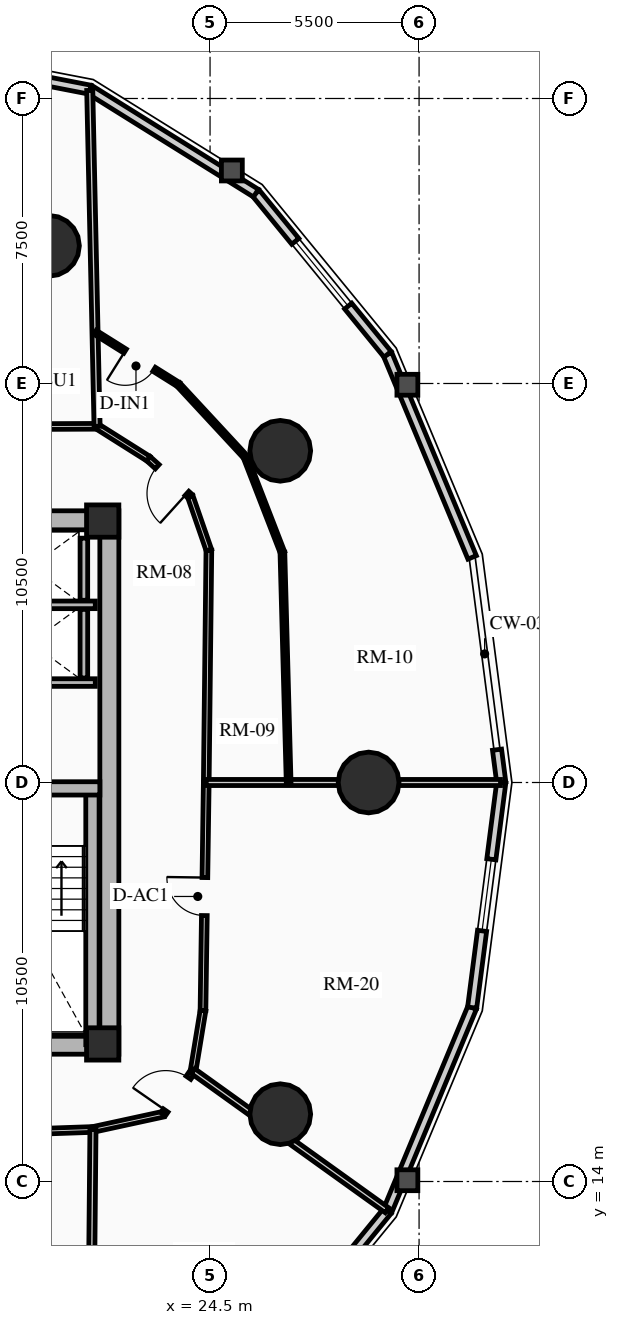
"""IFC4 building model, lengths in metres.
Left out: names, types, materials, properties, quantities, classifications, styles, units other than length and angle.
Written with IfcOpenShell. Run it as: python <this file> out.ifc"""

import sys

from ifc_helpers import new_model, si_unit, direction, frame, frame_2d, origin, origin_2d, place, context, subcontext, project, spatial, rectangle, circle, extrude, source, transform, mapped, element, fill, save


model = new_model("IFC4")
c1 = context("Model", 3, precision=1e-05, world=origin(), true_north=direction((0.0, 1.0)))
c2 = subcontext(c1, "Body", "Model", "MODEL_VIEW")
j1 = project(units=[si_unit("LENGTHUNIT", "METRE"), si_unit("PLANEANGLEUNIT", "RADIAN")], contexts=[c1])
p1 = place(None, origin())
s1 = spatial("IfcSite", under=j1, at=p1, CompositionType="ELEMENT")
p2 = place(p1, origin())
s2 = spatial("IfcBuilding", under=s1, at=p2, CompositionType="ELEMENT")
p3 = place(p2, frame((0.0, 0.0, 62.74)))
s3 = spatial("IfcBuildingStorey", under=s2, at=p3, CompositionType="ELEMENT", Elevation=62.74)
p4 = place(p3, frame((21.85, 17.35, 0.0), z_axis=(0.0, 0.0, 1.0), x_axis=(0.0, 1.0, 0.0)))
e1 = element("IfcWall", 1, at=p4, inside=s3, PredefinedType="SHEAR", context=c2, shape_type="SweptSolid", body=[
    extrude(rectangle(XDim=14.3, YDim=0.5, at=frame_2d((7.15, 0.0))), origin(), (0.0, 0.0, 1.0), 2.91),
])
p5 = place(p3, frame((11.15, 17.6, 0.0), z_axis=(0.0, 0.0, 1.0), x_axis=(1.0, 0.0, 0.0)))
e2 = element("IfcWall", 2, at=p5, inside=s3, PredefinedType="SHEAR", context=c2, shape_type="SweptSolid", body=[
    extrude(rectangle(XDim=10.7, YDim=0.5, at=frame_2d((5.35, 0.0))), origin(), (0.0, 0.0, 1.0), 2.91),
])
m1 = source(origin(), c2, "Body", "SweptSolid", [
    extrude(rectangle(XDim=1.5, YDim=2.02, at=frame_2d((0.75, 1.01))), frame((0.0, 0.26, 0.0), z_axis=(0.0, -1.0, 0.0), x_axis=(1.0, 0.0, 0.0)), (0.0, 0.0, 1.0), 0.52),
])
p6 = place(p5, frame((5.45, 0.0, 0.0)))
e3 = element("IfcOpeningElement", 3, at=p6, cuts=e2, PredefinedType="OPENING", context=c2, shape_type="MappedRepresentation", body=[
    mapped(m1, transform((0.0, 0.0, 0.0), x_axis=(1.0, 0.0, 0.0), y_axis=(0.0, 1.0, 0.0), z_axis=(0.0, 0.0, 1.0), scale=1.0)),
])
p7 = place(p3, frame((11.15, 31.4, 0.0), z_axis=(0.0, 0.0, 1.0), x_axis=(1.0, 0.0, 0.0)))
e4 = element("IfcWall", 4, at=p7, inside=s3, PredefinedType="SHEAR", context=c2, shape_type="SweptSolid", body=[
    extrude(rectangle(XDim=10.7, YDim=0.5, at=frame_2d((5.35, 0.0))), origin(), (0.0, 0.0, 1.0), 2.91),
])
p8 = place(p7, frame((4.6, 0.0, 0.0)))
e5 = element("IfcOpeningElement", 5, at=p8, cuts=e4, PredefinedType="OPENING", context=c2, shape_type="MappedRepresentation", body=[
    mapped(m1, transform((0.0, 0.0, 0.0), x_axis=(1.0, 0.0, 0.0), y_axis=(0.0, 1.0, 0.0), z_axis=(0.0, 0.0, 1.0), scale=1.0)),
])
p9 = place(p3, frame((21.405, 17.6, 0.0), z_axis=(0.0, 0.0, 1.0), x_axis=(0.0, 1.0, 0.0)))
e6 = element("IfcWall", 6, at=p9, inside=s3, PredefinedType="SHEAR", context=c2, shape_type="SweptSolid", body=[
    extrude(rectangle(XDim=6.745, YDim=0.35, at=frame_2d((3.373, 0.0))), origin(), (0.0, 0.0, 1.0), 2.91),
])
p10 = place(p3, frame((18.315, 24.345, 0.0), z_axis=(0.0, 0.0, 1.0), x_axis=(1.0, 0.0, 0.0)))
e7 = element("IfcWall", 7, at=p10, inside=s3, PredefinedType="SHEAR", context=c2, shape_type="SweptSolid", body=[
    extrude(rectangle(XDim=3.285, YDim=0.35, at=frame_2d((1.643, 0.0))), origin(), (0.0, 0.0, 1.0), 2.91),
])
for number, where, z_axis, x_axis in (
    (8, (21.675, 17.62, 0.0), (0.0, 0.0, 1.0), (1.0, 0.0, 0.0)),
    (9, (21.675, 31.38, 0.0), (0.0, 0.0, 1.0), (1.0, 0.0, 0.0)),
):
    element("IfcColumn", number, at=place(p3, frame(where, z_axis=z_axis, x_axis=x_axis)), inside=s3, PredefinedType="COLUMN", context=c2, shape_type="SweptSolid", body=[
        extrude(rectangle(XDim=0.85, YDim=0.85, at=origin_2d()), origin(), (0.0, 0.0, 1.0), 2.91),
    ])
for number, where, z_axis, x_axis in (
    (10, (28.672, 24.5, 0.0), (0.0, 0.0, 1.0), (1.0, 0.0, 0.0)),
    (11, (26.347, 33.229, 0.0), (0.0, 0.0, 1.0), (1.0, 0.0, 0.0)),
    (12, (20.261, 38.623, 0.0), (0.0, 0.0, 1.0), (1.0, 0.0, 0.0)),
    (13, (26.347, 15.771, 0.0), (0.0, 0.0, 1.0), (1.0, 0.0, 0.0)),
):
    element("IfcColumn", number, at=place(p3, frame(where, z_axis=z_axis, x_axis=x_axis)), inside=s3, PredefinedType="USERDEFINED", context=c2, shape_type="SweptSolid", body=[
        extrude(circle(Radius=0.8, at=origin_2d()), origin(), (0.0, 0.0, 1.0), 2.91),
    ])
p11 = place(p3, frame((32.051, 25.363, 0.0), z_axis=(0.0, 0.0, 1.0), x_axis=(0.128523364007, -0.991706481225, 0.0)))
e14 = element("IfcWall", 14, at=p11, inside=s3, PredefinedType="SOLIDWALL", context=c2, shape_type="SweptSolid", body=[
    extrude(rectangle(XDim=0.87, YDim=0.24, at=frame_2d((0.435, 0.0))), origin(), (0.0, 0.0, 1.0), 2.555),
])
p12 = place(p3, frame((29.172, 35.768, 0.0), z_axis=(0.0, 0.0, 1.0), x_axis=(0.384348836956, -0.923187939442, 0.0)))
e15 = element("IfcWall", 15, at=p12, inside=s3, PredefinedType="SOLIDWALL", context=c2, shape_type="SweptSolid", body=[
    extrude(rectangle(XDim=5.789, YDim=0.24, at=frame_2d((2.894, 0.0))), origin(), (0.0, 0.0, 1.0), 2.079),
])
p13 = place(p3, frame((25.707, 40.009, 0.0), z_axis=(0.0, 0.0, 1.0), x_axis=(0.632713287022, -0.77438614168, 0.0)))
e16 = element("IfcWall", 16, at=p13, inside=s3, PredefinedType="SOLIDWALL", context=c2, shape_type="SweptSolid", body=[
    extrude(rectangle(XDim=5.477, YDim=0.24, at=frame_2d((2.738, 0.0))), origin(), (0.0, 0.0, 1.0), 2.079),
])
m2 = source(origin(), c2, "Body", "SweptSolid", [
    extrude(rectangle(XDim=2.2, YDim=1.35, at=frame_2d((1.1, 0.675))), frame((0.0, 0.13, 0.0), z_axis=(0.0, -1.0, 0.0), x_axis=(1.0, 0.0, 0.0)), (0.0, 0.0, 1.0), 0.26),
])
p14 = place(p13, frame((1.638, 0.0, 0.65)))
e17 = element("IfcOpeningElement", 17, at=p14, cuts=e16, PredefinedType="OPENING", context=c2, shape_type="MappedRepresentation", body=[
    mapped(m2, transform((0.0, 0.0, 0.0), x_axis=(1.0, 0.0, 0.0), y_axis=(0.0, 1.0, 0.0), z_axis=(0.0, 0.0, 1.0), scale=1.0)),
])
p15 = place(p3, frame((21.34, 42.732, 0.0), z_axis=(0.0, 0.0, 1.0), x_axis=(0.848533613342, -0.529141481107, 0.0)))
e18 = element("IfcWall", 18, at=p15, inside=s3, PredefinedType="SOLIDWALL", context=c2, shape_type="SweptSolid", body=[
    extrude(rectangle(XDim=5.146, YDim=0.24, at=frame_2d((2.573, 0.0))), origin(), (0.0, 0.0, 1.0), 2.079),
])
p16 = place(p3, frame((16.5, 43.67, 0.0), z_axis=(0.0, 0.0, 1.0), x_axis=(0.981725274071, -0.190303668512, 0.0)))
e19 = element("IfcWall", 19, at=p16, inside=s3, PredefinedType="SOLIDWALL", context=c2, shape_type="SweptSolid", body=[
    extrude(rectangle(XDim=4.93, YDim=0.24, at=frame_2d((2.465, 0.0))), origin(), (0.0, 0.0, 1.0), 2.079),
])
m3 = source(origin(), c2, "Body", "SweptSolid", [
    extrude(rectangle(XDim=1.9, YDim=1.35, at=frame_2d((0.95, 0.675))), frame((0.0, 0.13, 0.0), z_axis=(0.0, -1.0, 0.0), x_axis=(1.0, 0.0, 0.0)), (0.0, 0.0, 1.0), 0.26),
])
p17 = place(p16, frame((1.515, 0.0, 0.65)))
e20 = element("IfcOpeningElement", 20, at=p17, cuts=e19, PredefinedType="OPENING", context=c2, shape_type="MappedRepresentation", body=[
    mapped(m3, transform((0.0, 0.0, 0.0), x_axis=(1.0, 0.0, 0.0), y_axis=(0.0, 1.0, 0.0), z_axis=(0.0, 0.0, 1.0), scale=1.0)),
])
p18 = place(p3, frame((29.172, 13.232, 0.0), z_axis=(0.0, 0.0, 1.0), x_axis=(-0.632713287022, -0.77438614168, 0.0)))
e21 = element("IfcWall", 21, at=p18, inside=s3, PredefinedType="SOLIDWALL", context=c2, shape_type="SweptSolid", body=[
    extrude(rectangle(XDim=5.477, YDim=0.24, at=frame_2d((2.738, 0.0))), origin(), (0.0, 0.0, 1.0), 2.079),
])
p19 = place(p18, frame((1.638, 0.0, 0.65)))
e22 = element("IfcOpeningElement", 22, at=p19, cuts=e21, PredefinedType="OPENING", context=c2, shape_type="MappedRepresentation", body=[
    mapped(m2, transform((0.0, 0.0, 0.0), x_axis=(1.0, 0.0, 0.0), y_axis=(0.0, 1.0, 0.0), z_axis=(0.0, 0.0, 1.0), scale=1.0)),
])
p20 = place(p3, frame((31.396, 18.576, 0.0), z_axis=(0.0, 0.0, 1.0), x_axis=(-0.384348836956, -0.923187939442, 0.0)))
e23 = element("IfcWall", 23, at=p20, inside=s3, PredefinedType="SOLIDWALL", context=c2, shape_type="SweptSolid", body=[
    extrude(rectangle(XDim=5.789, YDim=0.24, at=frame_2d((2.894, 0.0))), origin(), (0.0, 0.0, 1.0), 2.079),
])
p21 = place(p3, frame((32.163, 24.5, 0.0), z_axis=(0.0, 0.0, 1.0), x_axis=(-0.128339641463, -0.991730274031, 0.0)))
e24 = element("IfcWall", 24, at=p21, inside=s3, PredefinedType="SOLIDWALL", context=c2, shape_type="SweptSolid", body=[
    extrude(rectangle(XDim=5.973, YDim=0.24, at=frame_2d((2.987, 0.0))), origin(), (0.0, 0.0, 1.0), 2.079),
])
p22 = place(p21, frame((2.037, 0.0, 0.65)))
e25 = element("IfcOpeningElement", 25, at=p22, cuts=e24, PredefinedType="OPENING", context=c2, shape_type="MappedRepresentation", body=[
    mapped(m3, transform((0.0, 0.0, 0.0), x_axis=(1.0, 0.0, 0.0), y_axis=(0.0, 1.0, 0.0), z_axis=(0.0, 0.0, 1.0), scale=1.0)),
])
for number, where, z_axis, x_axis in (
    (26, (18.51, 27.13, 0.0), (0.0, 0.0, 1.0), (1.0, 0.0, 0.0)),
    (27, (18.51, 29.175, 0.0), (0.0, 0.0, 1.0), (1.0, 0.0, 0.0)),
):
    element("IfcWall", number, at=place(p3, frame(where, z_axis=z_axis, x_axis=x_axis)), inside=s3, PredefinedType="SHEAR", context=c2, shape_type="SweptSolid", body=[
        extrude(rectangle(XDim=2.97, YDim=0.2, at=frame_2d((1.485, 0.0))), origin(), (0.0, 0.0, 1.0), 2.91),
    ])
p23 = place(p3, frame((21.18, 27.25, 0.0), z_axis=(0.0, 0.0, 1.0), x_axis=(0.0, 1.0, 0.0)))
e28 = element("IfcWall", 28, at=p23, inside=s3, PredefinedType="SHEAR", context=c2, shape_type="SweptSolid", body=[
    extrude(rectangle(XDim=1.805, YDim=0.2, at=frame_2d((0.902, 0.0))), origin(), (0.0, 0.0, 1.0), 2.91),
])
p24 = place(p3, frame((21.18, 29.295, 0.0), z_axis=(0.0, 0.0, 1.0), x_axis=(0.0, 1.0, 0.0)))
e29 = element("IfcWall", 29, at=p24, inside=s3, PredefinedType="SHEAR", context=c2, shape_type="SweptSolid", body=[
    extrude(rectangle(XDim=1.635, YDim=0.2, at=frame_2d((0.817, 0.0))), origin(), (0.0, 0.0, 1.0), 2.91),
])
p25 = place(p3, frame((24.4, 24.5, 0.0), z_axis=(0.0, 0.0, 1.0), x_axis=(0.011299841544, 0.999936154752, 0.0)))
e30 = element("IfcWall", 30, at=p25, inside=s3, PredefinedType="PARTITIONING", context=c2, shape_type="SweptSolid", body=[
    extrude(rectangle(XDim=6.115, YDim=0.15, at=frame_2d((3.057, 0.0))), origin(), (0.0, 0.0, 1.0), 2.079),
])
p26 = place(p3, frame((24.469, 30.614, 0.0), z_axis=(0.0, 0.0, 1.0), x_axis=(-0.327228335485, 0.944945298129, 0.0)))
e31 = element("IfcWall", 31, at=p26, inside=s3, PredefinedType="PARTITIONING", context=c2, shape_type="SweptSolid", body=[
    extrude(rectangle(XDim=1.495, YDim=0.15, at=frame_2d((0.748, 0.0))), origin(), (0.0, 0.0, 1.0), 2.125),
])
p27 = place(p3, frame((23.98, 32.027, 0.0), z_axis=(0.0, 0.0, 1.0), x_axis=(-0.742353224332, 0.670008724065, 0.0)))
e32 = element("IfcWall", 32, at=p27, inside=s3, PredefinedType="PARTITIONING", context=c2, shape_type="SweptSolid", body=[
    extrude(rectangle(XDim=1.485, YDim=0.15, at=frame_2d((0.742, 0.0))), origin(), (0.0, 0.0, 1.0), 2.079),
])
m4 = source(origin(), c2, "Body", "SweptSolid", [
    extrude(rectangle(XDim=1.05, YDim=2.015, at=frame_2d((0.525, 1.007))), frame((0.0, 0.085, 0.0), z_axis=(0.0, -1.0, 0.0), x_axis=(1.0, 0.0, 0.0)), (0.0, 0.0, 1.0), 0.17),
])
p28 = place(p27, frame((0.12, 0.0, 0.0)))
e33 = element("IfcOpeningElement", 33, at=p28, cuts=e32, PredefinedType="OPENING", context=c2, shape_type="MappedRepresentation", body=[
    mapped(m4, transform((0.0, 0.0, 0.0), x_axis=(1.0, 0.0, 0.0), y_axis=(0.0, 1.0, 0.0), z_axis=(0.0, 0.0, 1.0), scale=1.0)),
])
p29 = place(p3, frame((22.877, 33.022, 0.0), z_axis=(0.0, 0.0, 1.0), x_axis=(-0.845895608855, 0.533348496689, 0.0)))
e34 = element("IfcWall", 34, at=p29, inside=s3, PredefinedType="PARTITIONING", context=c2, shape_type="SweptSolid", body=[
    extrude(rectangle(XDim=1.597, YDim=0.15, at=frame_2d((0.798, 0.0))), origin(), (0.0, 0.0, 1.0), 2.125),
])
p30 = place(p3, frame((21.527, 33.873, 0.0), z_axis=(0.0, 0.0, 1.0), x_axis=(-0.999991838845, -0.004040079574, 0.0)))
e35 = element("IfcWall", 35, at=p30, inside=s3, PredefinedType="PARTITIONING", context=c2, shape_type="SweptSolid", body=[
    extrude(rectangle(XDim=3.384, YDim=0.15, at=frame_2d((1.692, 0.0))), origin(), (0.0, 0.0, 1.0), 2.079),
])
p31 = place(p30, frame((1.56, 0.0, 0.0)))
e36 = element("IfcOpeningElement", 36, at=p31, cuts=e35, PredefinedType="OPENING", context=c2, shape_type="MappedRepresentation", body=[
    mapped(m4, transform((0.0, 0.0, 0.0), x_axis=(1.0, 0.0, 0.0), y_axis=(0.0, 1.0, 0.0), z_axis=(0.0, 0.0, 1.0), scale=1.0)),
])
p32 = place(p3, frame((14.781, 15.141, 0.0), z_axis=(0.0, 0.0, 1.0), x_axis=(0.999407918707, 0.034406569513, 0.0)))
e37 = element("IfcWall", 37, at=p32, inside=s3, PredefinedType="PARTITIONING", context=c2, shape_type="SweptSolid", body=[
    extrude(rectangle(XDim=6.642, YDim=0.15, at=frame_2d((3.321, 0.0))), origin(), (0.0, 0.0, 1.0), 2.079),
])
p33 = place(p3, frame((21.419, 15.369, 0.0), z_axis=(0.0, 0.0, 1.0), x_axis=(0.977192701953, 0.212354475464, 0.0)))
e38 = element("IfcWall", 38, at=p33, inside=s3, PredefinedType="PARTITIONING", context=c2, shape_type="SweptSolid", body=[
    extrude(rectangle(XDim=1.888, YDim=0.15, at=frame_2d((0.944, 0.0))), origin(), (0.0, 0.0, 1.0), 2.125),
])
p34 = place(p3, frame((23.263, 15.77, 0.0), z_axis=(0.0, 0.0, 1.0), x_axis=(0.570743456919, 0.821128434768, 0.0)))
e39 = element("IfcWall", 39, at=p34, inside=s3, PredefinedType="PARTITIONING", context=c2, shape_type="SweptSolid", body=[
    extrude(rectangle(XDim=1.382, YDim=0.15, at=frame_2d((0.691, 0.0))), origin(), (0.0, 0.0, 1.0), 2.079),
])
p35 = place(p34, frame((0.12, 0.0, 0.0)))
e40 = element("IfcOpeningElement", 40, at=p35, cuts=e39, PredefinedType="OPENING", context=c2, shape_type="MappedRepresentation", body=[
    mapped(m4, transform((0.0, 0.0, 0.0), x_axis=(1.0, 0.0, 0.0), y_axis=(0.0, 1.0, 0.0), z_axis=(0.0, 0.0, 1.0), scale=1.0)),
])
p36 = place(p3, frame((24.052, 16.905, 0.0), z_axis=(0.0, 0.0, 1.0), x_axis=(0.162091534225, 0.986775726562, 0.0)))
e41 = element("IfcWall", 41, at=p36, inside=s3, PredefinedType="PARTITIONING", context=c2, shape_type="SweptSolid", body=[
    extrude(rectangle(XDim=1.613, YDim=0.15, at=frame_2d((0.807, 0.0))), origin(), (0.0, 0.0, 1.0), 2.125),
])
p37 = place(p3, frame((24.313, 18.496, 0.0), z_axis=(0.0, 0.0, 1.0), x_axis=(0.014394019188, 0.999896400739, 0.0)))
e42 = element("IfcWall", 42, at=p37, inside=s3, PredefinedType="PARTITIONING", context=c2, shape_type="SweptSolid", body=[
    extrude(rectangle(XDim=6.004, YDim=0.15, at=frame_2d((3.002, 0.0))), origin(), (0.0, 0.0, 1.0), 2.555),
])
m5 = source(origin(), c2, "Body", "SweptSolid", [
    extrude(rectangle(XDim=1.0, YDim=2.015, at=frame_2d((0.5, 1.007))), frame((0.0, 0.085, 0.0), z_axis=(0.0, -1.0, 0.0), x_axis=(1.0, 0.0, 0.0)), (0.0, 0.0, 1.0), 0.17),
])
p38 = place(p37, frame((2.502, 0.0, 0.0)))
e43 = element("IfcOpeningElement", 43, at=p38, cuts=e42, PredefinedType="OPENING", context=c2, shape_type="MappedRepresentation", body=[
    mapped(m5, transform((0.0, 0.0, 0.0), x_axis=(1.0, 0.0, 0.0), y_axis=(0.0, 1.0, 0.0), z_axis=(0.0, 0.0, 1.0), scale=1.0)),
])
p39 = place(p3, frame((24.4, 24.5, 0.0), z_axis=(0.0, 0.0, 1.0), x_axis=(1.0, 0.0, 0.0)))
e44 = element("IfcWall", 44, at=p39, inside=s3, PredefinedType="PARTITIONING", context=c2, shape_type="SweptSolid", body=[
    extrude(rectangle(XDim=7.743, YDim=0.16, at=frame_2d((3.872, 0.0))), origin(), (0.0, 0.0, 1.0), 2.079),
])
p40 = place(p3, frame((21.527, 33.873, 0.0), z_axis=(0.0, 0.0, 1.0), x_axis=(-0.021814395676, 0.999762037758, 0.0)))
e45 = element("IfcWall", 45, at=p40, inside=s3, PredefinedType="PARTITIONING", context=c2, shape_type="SweptSolid", body=[
    extrude(rectangle(XDim=8.842, YDim=0.16, at=frame_2d((4.421, 0.0))), origin(), (0.0, 0.0, 1.0), 2.079),
])
p41 = place(p3, frame((21.419, 15.369, 0.0), z_axis=(0.0, 0.0, 1.0), x_axis=(-0.009327801925, -0.999956495109, 0.0)))
e46 = element("IfcWall", 46, at=p41, inside=s3, PredefinedType="PARTITIONING", context=c2, shape_type="SweptSolid", body=[
    extrude(rectangle(XDim=9.082, YDim=0.16, at=frame_2d((4.541, 0.0))), origin(), (0.0, 0.0, 1.0), 2.079),
])
p42 = place(p3, frame((24.052, 16.905, 0.0), z_axis=(0.0, 0.0, 1.0), x_axis=(0.812581474608, -0.582847619129, 0.0)))
e47 = element("IfcWall", 47, at=p42, inside=s3, PredefinedType="PARTITIONING", context=c2, shape_type="SweptSolid", body=[
    extrude(rectangle(XDim=6.281, YDim=0.16, at=frame_2d((3.14, 0.0))), origin(), (0.0, 0.0, 1.0), 2.079),
])
p43 = place(p3, frame((26.568, 24.5, 0.0), z_axis=(0.0, 0.0, 1.0), x_axis=(-0.027187947422, 0.999630339433, 0.0)))
e48 = element("IfcWall", 48, at=p43, inside=s3, PredefinedType="PARTITIONING", context=c2, shape_type="SweptSolid", body=[
    extrude(rectangle(XDim=6.061, YDim=0.125, at=frame_2d((3.031, 0.0))), origin(), (0.0, 0.0, 1.0), 2.079),
])
p44 = place(p3, frame((26.403, 30.559, 0.0), z_axis=(0.0, 0.0, 1.0), x_axis=(-0.361637165216, 0.932318915787, 0.0)))
e49 = element("IfcWall", 49, at=p44, inside=s3, PredefinedType="PARTITIONING", context=c2, shape_type="SweptSolid", body=[
    extrude(rectangle(XDim=2.694, YDim=0.125, at=frame_2d((1.347, 0.0))), origin(), (0.0, 0.0, 1.0), 2.079),
])
p45 = place(p3, frame((25.429, 33.071, 0.0), z_axis=(0.0, 0.0, 1.0), x_axis=(-0.679623863187, 0.733560770889, 0.0)))
e50 = element("IfcWall", 50, at=p45, inside=s3, PredefinedType="PARTITIONING", context=c2, shape_type="SweptSolid", body=[
    extrude(rectangle(XDim=2.594, YDim=0.125, at=frame_2d((1.297, 0.0))), origin(), (0.0, 0.0, 1.0), 2.555),
])
p46 = place(p3, frame((23.666, 34.974, 0.0), z_axis=(0.0, 0.0, 1.0), x_axis=(-0.847319394731, 0.531083650014, 0.0)))
e51 = element("IfcWall", 51, at=p46, inside=s3, PredefinedType="PARTITIONING", context=c2, shape_type="SweptSolid", body=[
    extrude(rectangle(XDim=2.589, YDim=0.125, at=frame_2d((1.294, 0.0))), origin(), (0.0, 0.0, 1.0), 2.125),
])
m6 = source(origin(), c2, "Body", "SweptSolid", [
    extrude(rectangle(XDim=0.9, YDim=2.005, at=frame_2d((0.45, 1.002))), frame((0.0, 0.073, 0.0), z_axis=(0.0, -1.0, 0.0), x_axis=(1.0, 0.0, 0.0)), (0.0, 0.0, 1.0), 0.145),
])
p47 = place(p46, frame((0.754, 0.0, 0.0)))
e52 = element("IfcOpeningElement", 52, at=p47, cuts=e51, PredefinedType="OPENING", context=c2, shape_type="MappedRepresentation", body=[
    mapped(m6, transform((0.0, 0.0, 0.0), x_axis=(1.0, 0.0, 0.0), y_axis=(0.0, 1.0, 0.0), z_axis=(0.0, 0.0, 1.0), scale=1.0)),
])
m7 = source(origin(), c2, "Body", "SweptSolid", [
    extrude(rectangle(XDim=2.2, YDim=1.35, at=frame_2d((1.1, 0.675))), frame((0.0, 0.03, 0.0), z_axis=(0.0, -1.0, 0.0), x_axis=(1.0, 0.0, 0.0)), (0.0, 0.0, 1.0), 0.06),
])
p48 = place(p14, origin())
e53 = element("IfcWindow", 53, at=p48, inside=s3, PartitioningType="DOUBLE_PANEL_VERTICAL", PredefinedType="WINDOW", context=c2, shape_type="MappedRepresentation", body=[
    mapped(m7, transform((0.0, 0.0, 0.0), x_axis=(1.0, 0.0, 0.0), y_axis=(0.0, 1.0, 0.0), z_axis=(0.0, 0.0, 1.0), scale=1.0)),
])
fill(e17, e53)
m8 = source(origin(), c2, "Body", "SweptSolid", [
    extrude(rectangle(XDim=1.9, YDim=1.35, at=frame_2d((0.95, 0.675))), frame((0.0, 0.03, 0.0), z_axis=(0.0, -1.0, 0.0), x_axis=(1.0, 0.0, 0.0)), (0.0, 0.0, 1.0), 0.06),
])
p49 = place(p22, origin())
e54 = element("IfcWindow", 54, at=p49, inside=s3, PartitioningType="DOUBLE_PANEL_VERTICAL", PredefinedType="WINDOW", context=c2, shape_type="MappedRepresentation", body=[
    mapped(m8, transform((0.0, 0.0, 0.0), x_axis=(1.0, 0.0, 0.0), y_axis=(0.0, 1.0, 0.0), z_axis=(0.0, 0.0, 1.0), scale=1.0)),
])
fill(e25, e54)
m9 = source(origin(), c2, "Body", "SweptSolid", [
    extrude(rectangle(XDim=1.05, YDim=2.015, at=frame_2d((0.525, 1.007))), frame((0.0, 0.025, 0.0), z_axis=(0.0, -1.0, 0.0), x_axis=(1.0, 0.0, 0.0)), (0.0, 0.0, 1.0), 0.05),
])
p50 = place(p28, origin())
e55 = element("IfcDoor", 55, at=p50, inside=s3, OperationType="SINGLE_SWING_LEFT", PredefinedType="DOOR", context=c2, shape_type="MappedRepresentation", body=[
    mapped(m9, transform((0.0, 0.0, 0.0), x_axis=(1.0, 0.0, 0.0), y_axis=(0.0, 1.0, 0.0), z_axis=(0.0, 0.0, 1.0), scale=1.0)),
])
fill(e33, e55)
m10 = source(origin(), c2, "Body", "SweptSolid", [
    extrude(rectangle(XDim=0.9, YDim=2.005, at=frame_2d((0.45, 1.002))), frame((0.0, 0.025, 0.0), z_axis=(0.0, -1.0, 0.0), x_axis=(1.0, 0.0, 0.0)), (0.0, 0.0, 1.0), 0.05),
])
p51 = place(p47, origin())
e56 = element("IfcDoor", 56, at=p51, inside=s3, OperationType="SINGLE_SWING_RIGHT", PredefinedType="DOOR", context=c2, shape_type="MappedRepresentation", body=[
    mapped(m10, transform((0.0, 0.0, 0.0), x_axis=(1.0, 0.0, 0.0), y_axis=(0.0, 1.0, 0.0), z_axis=(0.0, 0.0, 1.0), scale=1.0)),
])
fill(e52, e56)
p52 = place(p35, origin())
e57 = element("IfcDoor", 57, at=p52, inside=s3, OperationType="SINGLE_SWING_LEFT", PredefinedType="DOOR", context=c2, shape_type="MappedRepresentation", body=[
    mapped(m9, transform((0.0, 0.0, 0.0), x_axis=(1.0, 0.0, 0.0), y_axis=(0.0, 1.0, 0.0), z_axis=(0.0, 0.0, 1.0), scale=1.0)),
])
fill(e40, e57)
m11 = source(origin(), c2, "Body", "SweptSolid", [
    extrude(rectangle(XDim=1.0, YDim=2.015, at=frame_2d((0.5, 1.007))), frame((0.0, 0.025, 0.0), z_axis=(0.0, -1.0, 0.0), x_axis=(1.0, 0.0, 0.0)), (0.0, 0.0, 1.0), 0.05),
])
p53 = place(p38, origin())
e58 = element("IfcDoor", 58, at=p53, inside=s3, OperationType="SINGLE_SWING_RIGHT", PredefinedType="DOOR", context=c2, shape_type="MappedRepresentation", body=[
    mapped(m11, transform((0.0, 0.0, 0.0), x_axis=(1.0, 0.0, 0.0), y_axis=(0.0, 1.0, 0.0), z_axis=(0.0, 0.0, 1.0), scale=1.0)),
])
fill(e43, e58)
save(model, sys.argv[1])
